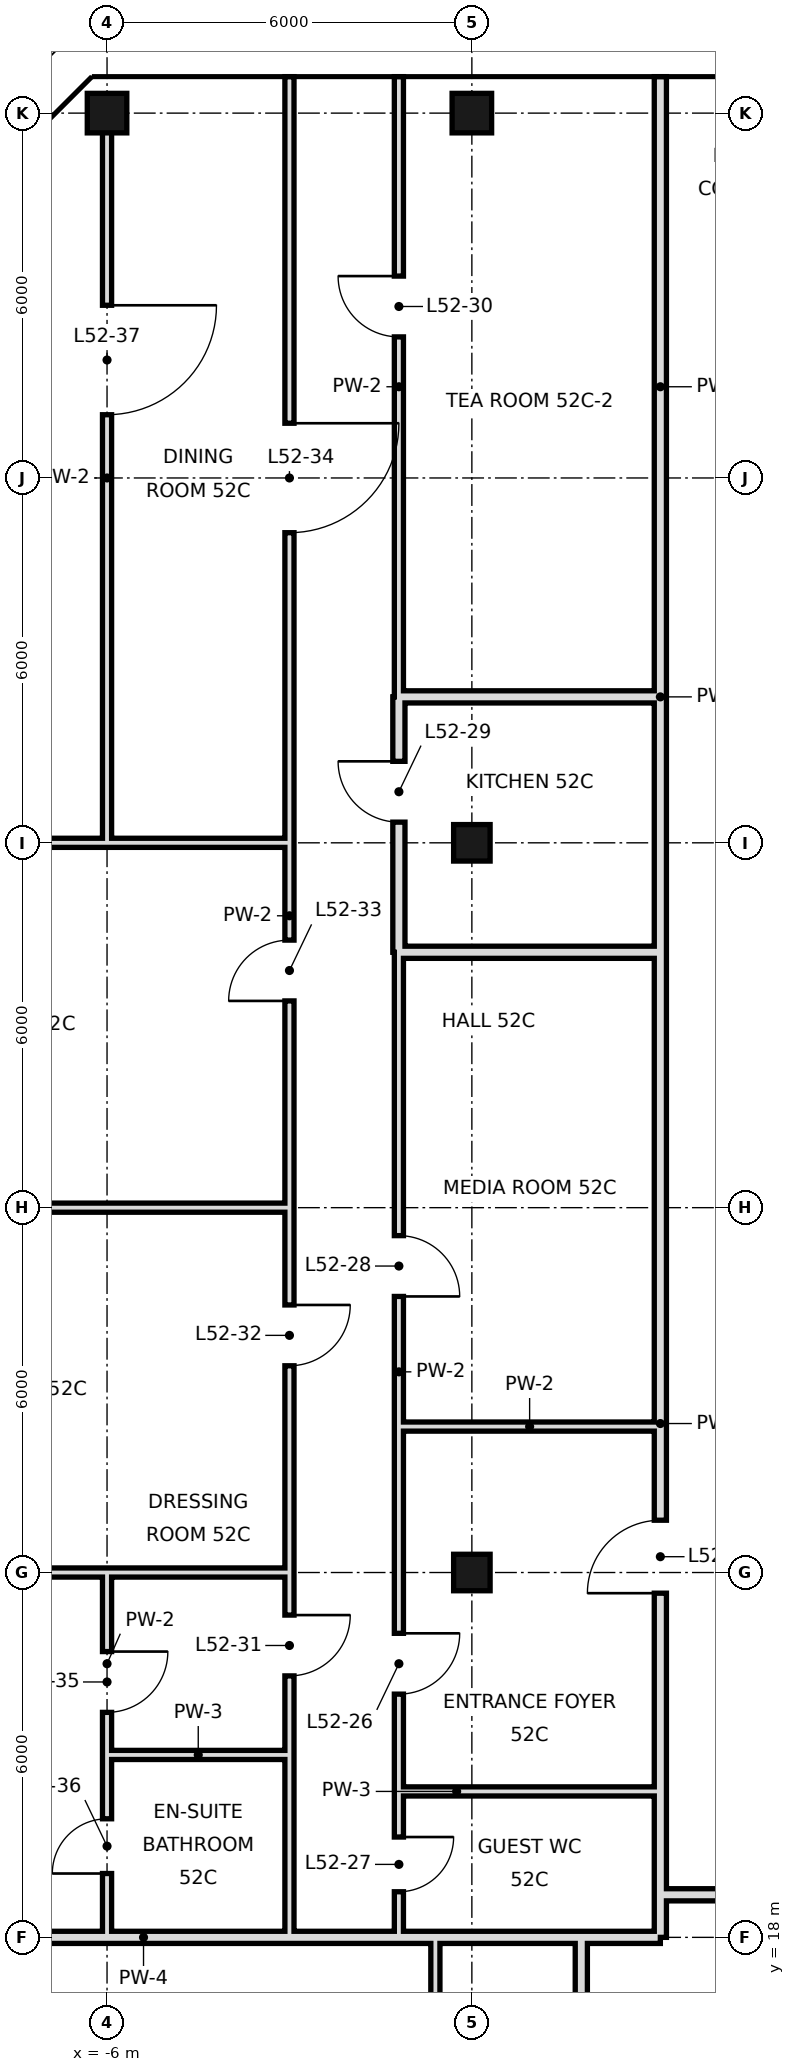
"""IFC4 building model, lengths in metres.
Left out: names, types, materials, properties, quantities, classifications, styles, units other than length and angle.
Written with IfcOpenShell. Run it as: python <this file> out.ifc"""

import sys

from ifc_helpers import new_model, si_unit, direction, frame, frame_2d, origin, origin_2d, place, context, subcontext, project, spatial, rectangle, hollow_rectangle, extrude, element, fill, save


model = new_model("IFC4")
c1 = context("Model", 3, precision=1e-05, world=origin(), true_north=direction((0.0, 1.0)))
c2 = subcontext(c1, "Body", "Model", "MODEL_VIEW")
j1 = project(units=[si_unit("LENGTHUNIT", "METRE"), si_unit("PLANEANGLEUNIT", "RADIAN")], contexts=[c1])
p1 = place(None, origin())
s1 = spatial("IfcSite", under=j1, at=p1, CompositionType="ELEMENT")
p2 = place(p1, origin())
s2 = spatial("IfcBuilding", under=s1, at=p2, CompositionType="ELEMENT")
p3 = place(p2, frame((0.0, 0.0, 222.6)))
s3 = spatial("IfcBuildingStorey", under=s2, at=p3, CompositionType="ELEMENT", Elevation=222.6)
p4 = place(p3, frame((-6.0, 48.0, 0.0), z_axis=(0.0, 0.0, 1.0), x_axis=(1.0, 0.0, 0.0)))
e1 = element("IfcColumn", 1, at=p4, inside=s3, PredefinedType="COLUMN", context=c2, shape_type="SweptSolid", body=[
    extrude(hollow_rectangle(XDim=0.65, YDim=0.65, WallThickness=0.032, at=origin_2d()), origin(), (0.0, 0.0, 1.0), 3.6),
])
for number, where, z_axis, x_axis in (
    (2, (0.0, 24.0, 0.0), (0.0, 0.0, 1.0), (1.0, 0.0, 0.0)),
    (3, (0.0, 36.0, 0.0), (0.0, 0.0, 1.0), (1.0, 0.0, 0.0)),
):
    element("IfcColumn", number, at=place(p3, frame(where, z_axis=z_axis, x_axis=x_axis)), inside=s3, PredefinedType="COLUMN", context=c2, shape_type="SweptSolid", body=[
        extrude(hollow_rectangle(XDim=0.6, YDim=0.6, WallThickness=0.028, at=origin_2d()), origin(), (0.0, 0.0, 1.0), 3.6),
    ])
p5 = place(p3, frame((0.0, 48.0, 0.0), z_axis=(0.0, 0.0, 1.0), x_axis=(1.0, 0.0, 0.0)))
e4 = element("IfcColumn", 4, at=p5, inside=s3, PredefinedType="COLUMN", context=c2, shape_type="SweptSolid", body=[
    extrude(hollow_rectangle(XDim=0.65, YDim=0.65, WallThickness=0.032, at=origin_2d()), origin(), (0.0, 0.0, 1.0), 3.6),
])
p6 = place(p3, frame((-0.6, 10.8, 0.0), z_axis=(0.0, 0.0, 1.0), x_axis=(0.0, 1.0, 0.0)))
e5 = element("IfcWall", 5, at=p6, inside=s3, PredefinedType="PARTITIONING", context=c2, shape_type="SweptSolid", body=[
    extrude(rectangle(XDim=7.2, YDim=0.15, at=frame_2d((3.6, 0.0))), origin(), (0.0, 0.0, 1.0), 3.42),
])
p7 = place(p3, frame((-1.2, 34.2, 0.0), z_axis=(0.0, 0.0, 1.0), x_axis=(0.0, 1.0, 0.0)))
e6 = element("IfcWall", 6, at=p7, inside=s3, PredefinedType="SOLIDWALL", context=c2, shape_type="SweptSolid", body=[
    extrude(rectangle(XDim=4.2, YDim=0.2, at=frame_2d((2.1, 0.0))), origin(), (0.0, 0.0, 1.0), 2.72),
])
p8 = place(p7, frame((2.14, 0.0, 0.0)))
e7 = element("IfcOpeningElement", 7, at=p8, cuts=e6, PredefinedType="OPENING", context=c2, shape_type="SweptSolid", body=[
    extrude(rectangle(XDim=1.0, YDim=2.4, at=frame_2d((0.5, 1.2))), frame((0.0, 0.11, 0.0), z_axis=(0.0, -1.0, 0.0), x_axis=(1.0, 0.0, 0.0)), (0.0, 0.0, 1.0), 0.22),
])
p9 = place(p3, frame((-1.2, 20.4, 0.0), z_axis=(0.0, 0.0, 1.0), x_axis=(0.0, 1.0, 0.0)))
e8 = element("IfcWall", 8, at=p9, inside=s3, PredefinedType="PARTITIONING", context=c2, shape_type="SweptSolid", body=[
    extrude(rectangle(XDim=13.8, YDim=0.15, at=frame_2d((6.9, 0.0))), origin(), (0.0, 0.0, 1.0), 3.42),
])
p10 = place(p9, frame((1.6, 0.0, 0.0)))
e9 = element("IfcOpeningElement", 9, at=p10, cuts=e8, PredefinedType="OPENING", context=c2, shape_type="SweptSolid", body=[
    extrude(rectangle(XDim=1.0, YDim=2.4, at=frame_2d((0.5, 1.2))), frame((0.0, 0.085, 0.0), z_axis=(0.0, -1.0, 0.0), x_axis=(1.0, 0.0, 0.0)), (0.0, 0.0, 1.0), 0.17),
])
p11 = place(p9, frame((8.14, 0.0, 0.0)))
e10 = element("IfcOpeningElement", 10, at=p11, cuts=e8, PredefinedType="OPENING", context=c2, shape_type="SweptSolid", body=[
    extrude(rectangle(XDim=1.0, YDim=2.4, at=frame_2d((0.5, 1.2))), frame((0.0, 0.085, 0.0), z_axis=(0.0, -1.0, 0.0), x_axis=(1.0, 0.0, 0.0)), (0.0, 0.0, 1.0), 0.17),
])
p12 = place(p3, frame((-1.2, 38.4, 0.0), z_axis=(0.0, 0.0, 1.0), x_axis=(0.0, 1.0, 0.0)))
e11 = element("IfcWall", 11, at=p12, inside=s3, PredefinedType="PARTITIONING", context=c2, shape_type="SweptSolid", body=[
    extrude(rectangle(XDim=10.2, YDim=0.15, at=frame_2d((5.1, 0.0))), origin(), (0.0, 0.0, 1.0), 3.42),
])
p13 = place(p12, frame((5.92, 0.0, 0.0)))
e12 = element("IfcOpeningElement", 12, at=p13, cuts=e11, PredefinedType="OPENING", context=c2, shape_type="SweptSolid", body=[
    extrude(rectangle(XDim=1.0, YDim=2.4, at=frame_2d((0.5, 1.2))), frame((0.0, 0.085, 0.0), z_axis=(0.0, -1.0, 0.0), x_axis=(1.0, 0.0, 0.0)), (0.0, 0.0, 1.0), 0.17),
])
p14 = place(p3, frame((-1.2, 18.0, 0.0), z_axis=(0.0, 0.0, 1.0), x_axis=(0.0, 1.0, 0.0)))
e13 = element("IfcWall", 13, at=p14, inside=s3, PredefinedType="PARTITIONING", context=c2, shape_type="SweptSolid", body=[
    extrude(rectangle(XDim=2.4, YDim=0.15, at=frame_2d((1.2, 0.0))), origin(), (0.0, 0.0, 1.0), 3.42),
])
p15 = place(p14, frame((0.75, 0.0, 0.0)))
e14 = element("IfcOpeningElement", 14, at=p15, cuts=e13, PredefinedType="OPENING", context=c2, shape_type="SweptSolid", body=[
    extrude(rectangle(XDim=0.9, YDim=2.4, at=frame_2d((0.45, 1.2))), frame((0.0, 0.085, 0.0), z_axis=(0.0, -1.0, 0.0), x_axis=(1.0, 0.0, 0.0)), (0.0, 0.0, 1.0), 0.17),
])
p16 = place(p3, frame((-3.0, 21.0, 0.0), z_axis=(0.0, 0.0, 1.0), x_axis=(0.0, 1.0, 0.0)))
e15 = element("IfcWall", 15, at=p16, inside=s3, PredefinedType="PARTITIONING", context=c2, shape_type="SweptSolid", body=[
    extrude(rectangle(XDim=27.6, YDim=0.15, at=frame_2d((13.8, 0.0))), origin(), (0.0, 0.0, 1.0), 3.42),
])
p17 = place(p16, frame((1.3, 0.0, 0.0)))
e16 = element("IfcOpeningElement", 16, at=p17, cuts=e15, PredefinedType="OPENING", context=c2, shape_type="SweptSolid", body=[
    extrude(rectangle(XDim=1.0, YDim=2.4, at=frame_2d((0.5, 1.2))), frame((0.0, 0.085, 0.0), z_axis=(0.0, -1.0, 0.0), x_axis=(1.0, 0.0, 0.0)), (0.0, 0.0, 1.0), 0.17),
])
p18 = place(p16, frame((6.4, 0.0, 0.0)))
e17 = element("IfcOpeningElement", 17, at=p18, cuts=e15, PredefinedType="OPENING", context=c2, shape_type="SweptSolid", body=[
    extrude(rectangle(XDim=1.0, YDim=2.4, at=frame_2d((0.5, 1.2))), frame((0.0, 0.085, 0.0), z_axis=(0.0, -1.0, 0.0), x_axis=(1.0, 0.0, 0.0)), (0.0, 0.0, 1.0), 0.17),
])
p19 = place(p16, frame((12.4, 0.0, 0.0)))
e18 = element("IfcOpeningElement", 18, at=p19, cuts=e15, PredefinedType="OPENING", context=c2, shape_type="SweptSolid", body=[
    extrude(rectangle(XDim=1.0, YDim=2.4, at=frame_2d((0.5, 1.2))), frame((0.0, 0.085, 0.0), z_axis=(0.0, -1.0, 0.0), x_axis=(1.0, 0.0, 0.0)), (0.0, 0.0, 1.0), 0.17),
])
p20 = place(p16, frame((20.1, 0.0, 0.0)))
e19 = element("IfcOpeningElement", 19, at=p20, cuts=e15, PredefinedType="OPENING", context=c2, shape_type="SweptSolid", body=[
    extrude(rectangle(XDim=1.8, YDim=2.4, at=frame_2d((0.9, 1.2))), frame((0.0, 0.085, 0.0), z_axis=(0.0, -1.0, 0.0), x_axis=(1.0, 0.0, 0.0)), (0.0, 0.0, 1.0), 0.17),
])
p21 = place(p3, frame((-3.0, 18.0, 0.0), z_axis=(0.0, 0.0, 1.0), x_axis=(0.0, 1.0, 0.0)))
e20 = element("IfcWall", 20, at=p21, inside=s3, PredefinedType="PARTITIONING", context=c2, shape_type="SweptSolid", body=[
    extrude(rectangle(XDim=3.0, YDim=0.15, at=frame_2d((1.5, 0.0))), origin(), (0.0, 0.0, 1.0), 3.42),
])
p22 = place(p3, frame((-6.0, 21.0, 0.0), z_axis=(0.0, 0.0, 1.0), x_axis=(0.0, 1.0, 0.0)))
e21 = element("IfcWall", 21, at=p22, inside=s3, PredefinedType="PARTITIONING", context=c2, shape_type="SweptSolid", body=[
    extrude(rectangle(XDim=3.0, YDim=0.15, at=frame_2d((1.5, 0.0))), origin(), (0.0, 0.0, 1.0), 3.42),
])
p23 = place(p22, frame((0.7, 0.0, 0.0)))
e22 = element("IfcOpeningElement", 22, at=p23, cuts=e21, PredefinedType="OPENING", context=c2, shape_type="SweptSolid", body=[
    extrude(rectangle(XDim=1.0, YDim=2.4, at=frame_2d((0.5, 1.2))), frame((0.0, 0.085, 0.0), z_axis=(0.0, -1.0, 0.0), x_axis=(1.0, 0.0, 0.0)), (0.0, 0.0, 1.0), 0.17),
])
p24 = place(p3, frame((-6.0, 36.0, 0.0), z_axis=(0.0, 0.0, 1.0), x_axis=(0.0, 1.0, 0.0)))
e23 = element("IfcWall", 23, at=p24, inside=s3, PredefinedType="PARTITIONING", context=c2, shape_type="SweptSolid", body=[
    extrude(rectangle(XDim=12.0, YDim=0.15, at=frame_2d((6.0, 0.0))), origin(), (0.0, 0.0, 1.0), 3.42),
])
p25 = place(p24, frame((7.04, 0.0, 0.0)))
e24 = element("IfcOpeningElement", 24, at=p25, cuts=e23, PredefinedType="OPENING", context=c2, shape_type="SweptSolid", body=[
    extrude(rectangle(XDim=1.8, YDim=2.4, at=frame_2d((0.9, 1.2))), frame((0.0, 0.085, 0.0), z_axis=(0.0, -1.0, 0.0), x_axis=(1.0, 0.0, 0.0)), (0.0, 0.0, 1.0), 0.17),
])
p26 = place(p3, frame((-6.0, 18.0, 0.0), z_axis=(0.0, 0.0, 1.0), x_axis=(0.0, 1.0, 0.0)))
e25 = element("IfcWall", 25, at=p26, inside=s3, PredefinedType="PARTITIONING", context=c2, shape_type="SweptSolid", body=[
    extrude(rectangle(XDim=3.0, YDim=0.15, at=frame_2d((1.5, 0.0))), origin(), (0.0, 0.0, 1.0), 3.42),
])
p27 = place(p26, frame((1.05, 0.0, 0.0)))
e26 = element("IfcOpeningElement", 26, at=p27, cuts=e25, PredefinedType="OPENING", context=c2, shape_type="SweptSolid", body=[
    extrude(rectangle(XDim=0.9, YDim=2.4, at=frame_2d((0.45, 1.2))), frame((0.0, 0.085, 0.0), z_axis=(0.0, -1.0, 0.0), x_axis=(1.0, 0.0, 0.0)), (0.0, 0.0, 1.0), 0.17),
])
p28 = place(p3, frame((1.8, 10.8, 0.0), z_axis=(0.0, 0.0, 1.0), x_axis=(0.0, 1.0, 0.0)))
e27 = element("IfcWall", 27, at=p28, inside=s3, PredefinedType="SOLIDWALL", context=c2, shape_type="SweptSolid", body=[
    extrude(rectangle(XDim=7.2, YDim=0.2, at=frame_2d((3.6, 0.0))), origin(), (0.0, 0.0, 1.0), 3.42),
])
p29 = place(p3, frame((3.1, 18.7, 0.0), z_axis=(0.0, 0.0, 1.0), x_axis=(0.0, 1.0, 0.0)))
e28 = element("IfcWall", 28, at=p29, inside=s3, PredefinedType="SOLIDWALL", context=c2, shape_type="SweptSolid", body=[
    extrude(rectangle(XDim=15.5, YDim=0.2, at=frame_2d((7.75, 0.0))), origin(), (0.0, 0.0, 1.0), 2.97),
])
p30 = place(p29, frame((4.96, 0.0, 0.0)))
e29 = element("IfcOpeningElement", 29, at=p30, cuts=e28, PredefinedType="OPENING", context=c2, shape_type="SweptSolid", body=[
    extrude(rectangle(XDim=1.2, YDim=2.4, at=frame_2d((0.6, 1.2))), frame((0.0, 0.11, 0.0), z_axis=(0.0, -1.0, 0.0), x_axis=(1.0, 0.0, 0.0)), (0.0, 0.0, 1.0), 0.22),
])
p31 = place(p3, frame((3.1, 38.4, 0.0), z_axis=(0.0, 0.0, 1.0), x_axis=(0.0, 1.0, 0.0)))
e30 = element("IfcWall", 30, at=p31, inside=s3, PredefinedType="SOLIDWALL", context=c2, shape_type="SweptSolid", body=[
    extrude(rectangle(XDim=10.2, YDim=0.2, at=frame_2d((5.1, 0.0))), origin(), (0.0, 0.0, 1.0), 2.72),
])
p32 = place(p3, frame((3.1, 18.0, 0.0), z_axis=(0.0, 0.0, 1.0), x_axis=(0.0, 1.0, 0.0)))
e31 = element("IfcWall", 31, at=p32, inside=s3, PredefinedType="SOLIDWALL", context=c2, shape_type="SweptSolid", body=[
    extrude(rectangle(XDim=0.7, YDim=0.2, at=frame_2d((0.35, 0.0))), origin(), (0.0, 0.0, 1.0), 2.97),
])
p33 = place(p3, frame((3.1, 34.2, 0.0), z_axis=(0.0, 0.0, 1.0), x_axis=(0.0, 1.0, 0.0)))
e32 = element("IfcWall", 32, at=p33, inside=s3, PredefinedType="SOLIDWALL", context=c2, shape_type="SweptSolid", body=[
    extrude(rectangle(XDim=4.2, YDim=0.2, at=frame_2d((2.1, 0.0))), origin(), (0.0, 0.0, 1.0), 3.42),
])
p34 = place(p3, frame((1.8, 18.0, 0.0), z_axis=(0.0, 0.0, 1.0), x_axis=(1.0, 0.0, 0.0)))
e33 = element("IfcWall", 33, at=p34, inside=s3, PredefinedType="SOLIDWALL", context=c2, shape_type="SweptSolid", body=[
    extrude(rectangle(XDim=1.3, YDim=0.2, at=frame_2d((0.65, 0.0))), origin(), (0.0, 0.0, 1.0), 2.97),
])
p35 = place(p3, frame((-12.6, 18.0, 0.0), z_axis=(0.0, 0.0, 1.0), x_axis=(1.0, 0.0, 0.0)))
e34 = element("IfcWall", 34, at=p35, inside=s3, PredefinedType="SOLIDWALL", context=c2, shape_type="SweptSolid", body=[
    extrude(rectangle(XDim=14.4, YDim=0.2, at=frame_2d((7.2, 0.0))), origin(), (0.0, 0.0, 1.0), 2.72),
])
p36 = place(p3, frame((3.1, 18.7, 0.0), z_axis=(0.0, 0.0, 1.0), x_axis=(1.0, 0.0, 0.0)))
e35 = element("IfcWall", 35, at=p36, inside=s3, PredefinedType="SOLIDWALL", context=c2, shape_type="SweptSolid", body=[
    extrude(rectangle(XDim=4.1, YDim=0.2, at=frame_2d((2.05, 0.0))), origin(), (0.0, 0.0, 1.0), 2.72),
])
p37 = place(p3, frame((-1.2, 20.4, 0.0), z_axis=(0.0, 0.0, 1.0), x_axis=(1.0, 0.0, 0.0)))
e36 = element("IfcWall", 36, at=p37, inside=s3, PredefinedType="PARTITIONING", context=c2, shape_type="SweptSolid", body=[
    extrude(rectangle(XDim=4.3, YDim=0.15, at=frame_2d((2.15, 0.0))), origin(), (0.0, 0.0, 1.0), 3.42),
])
p38 = place(p3, frame((-6.0, 21.0, 0.0), z_axis=(0.0, 0.0, 1.0), x_axis=(1.0, 0.0, 0.0)))
e37 = element("IfcWall", 37, at=p38, inside=s3, PredefinedType="PARTITIONING", context=c2, shape_type="SweptSolid", body=[
    extrude(rectangle(XDim=3.0, YDim=0.15, at=frame_2d((1.5, 0.0))), origin(), (0.0, 0.0, 1.0), 3.42),
])
p39 = place(p3, frame((-12.0, 24.0, 0.0), z_axis=(0.0, 0.0, 1.0), x_axis=(1.0, 0.0, 0.0)))
e38 = element("IfcWall", 38, at=p39, inside=s3, PredefinedType="PARTITIONING", context=c2, shape_type="SweptSolid", body=[
    extrude(rectangle(XDim=9.0, YDim=0.15, at=frame_2d((4.5, 0.0))), origin(), (0.0, 0.0, 1.0), 2.72),
])
p40 = place(p3, frame((-1.2, 26.4, 0.0), z_axis=(0.0, 0.0, 1.0), x_axis=(1.0, 0.0, 0.0)))
e39 = element("IfcWall", 39, at=p40, inside=s3, PredefinedType="PARTITIONING", context=c2, shape_type="SweptSolid", body=[
    extrude(rectangle(XDim=4.3, YDim=0.15, at=frame_2d((2.15, 0.0))), origin(), (0.0, 0.0, 1.0), 3.42),
])
p41 = place(p3, frame((-12.6, 30.0, 0.0), z_axis=(0.0, 0.0, 1.0), x_axis=(1.0, 0.0, 0.0)))
e40 = element("IfcWall", 40, at=p41, inside=s3, PredefinedType="PARTITIONING", context=c2, shape_type="SweptSolid", body=[
    extrude(rectangle(XDim=9.6, YDim=0.15, at=frame_2d((4.8, 0.0))), origin(), (0.0, 0.0, 1.0), 2.72),
])
p42 = place(p3, frame((-1.2, 34.2, 0.0), z_axis=(0.0, 0.0, 1.0), x_axis=(1.0, 0.0, 0.0)))
e41 = element("IfcWall", 41, at=p42, inside=s3, PredefinedType="SOLIDWALL", context=c2, shape_type="SweptSolid", body=[
    extrude(rectangle(XDim=4.3, YDim=0.2, at=frame_2d((2.15, 0.0))), origin(), (0.0, 0.0, 1.0), 2.72),
])
p43 = place(p3, frame((-12.0, 36.0, 0.0), z_axis=(0.0, 0.0, 1.0), x_axis=(1.0, 0.0, 0.0)))
e42 = element("IfcWall", 42, at=p43, inside=s3, PredefinedType="PARTITIONING", context=c2, shape_type="SweptSolid", body=[
    extrude(rectangle(XDim=9.0, YDim=0.15, at=frame_2d((4.5, 0.0))), origin(), (0.0, 0.0, 1.0), 2.72),
])
p44 = place(p3, frame((-1.2, 38.4, 0.0), z_axis=(0.0, 0.0, 1.0), x_axis=(1.0, 0.0, 0.0)))
e43 = element("IfcWall", 43, at=p44, inside=s3, PredefinedType="SOLIDWALL", context=c2, shape_type="SweptSolid", body=[
    extrude(rectangle(XDim=4.3, YDim=0.2, at=frame_2d((2.15, 0.0))), origin(), (0.0, 0.0, 1.0), 2.72),
])
p45 = place(p10, origin())
e44 = element("IfcDoor", 44, at=p45, inside=s3, OperationType="SINGLE_SWING_RIGHT", PredefinedType="DOOR", context=c2, shape_type="SweptSolid", body=[
    extrude(rectangle(XDim=1.0, YDim=2.4, at=frame_2d((0.5, 1.2))), frame((0.0, 0.025, 0.0), z_axis=(0.0, -1.0, 0.0), x_axis=(1.0, 0.0, 0.0)), (0.0, 0.0, 1.0), 0.05),
])
fill(e9, e44)
p46 = place(p15, origin())
e45 = element("IfcDoor", 45, at=p46, inside=s3, OperationType="SINGLE_SWING_RIGHT", PredefinedType="DOOR", context=c2, shape_type="SweptSolid", body=[
    extrude(rectangle(XDim=0.9, YDim=2.4, at=frame_2d((0.45, 1.2))), frame((0.0, 0.025, 0.0), z_axis=(0.0, -1.0, 0.0), x_axis=(1.0, 0.0, 0.0)), (0.0, 0.0, 1.0), 0.05),
])
fill(e14, e45)
p47 = place(p11, frame((1.0, 0.0, 0.0), z_axis=(0.0, 0.0, 1.0), x_axis=(-1.0, 0.0, 0.0)))
e46 = element("IfcDoor", 46, at=p47, inside=s3, OperationType="SINGLE_SWING_RIGHT", PredefinedType="DOOR", context=c2, shape_type="SweptSolid", body=[
    extrude(rectangle(XDim=1.0, YDim=2.4, at=frame_2d((0.5, 1.2))), frame((0.0, 0.025, 0.0), z_axis=(0.0, -1.0, 0.0), x_axis=(1.0, 0.0, 0.0)), (0.0, 0.0, 1.0), 0.05),
])
fill(e10, e46)
p48 = place(p8, frame((1.0, 0.0, 0.0), z_axis=(0.0, 0.0, 1.0), x_axis=(-1.0, 0.0, 0.0)))
e47 = element("IfcDoor", 47, at=p48, inside=s3, OperationType="SINGLE_SWING_LEFT", PredefinedType="DOOR", context=c2, shape_type="SweptSolid", body=[
    extrude(rectangle(XDim=1.0, YDim=2.4, at=frame_2d((0.5, 1.2))), frame((0.0, 0.025, 0.0), z_axis=(0.0, -1.0, 0.0), x_axis=(1.0, 0.0, 0.0)), (0.0, 0.0, 1.0), 0.05),
])
fill(e7, e47)
p49 = place(p13, frame((1.0, 0.0, 0.0), z_axis=(0.0, 0.0, 1.0), x_axis=(-1.0, 0.0, 0.0)))
e48 = element("IfcDoor", 48, at=p49, inside=s3, OperationType="SINGLE_SWING_LEFT", PredefinedType="DOOR", context=c2, shape_type="SweptSolid", body=[
    extrude(rectangle(XDim=1.0, YDim=2.4, at=frame_2d((0.5, 1.2))), frame((0.0, 0.025, 0.0), z_axis=(0.0, -1.0, 0.0), x_axis=(1.0, 0.0, 0.0)), (0.0, 0.0, 1.0), 0.05),
])
fill(e12, e48)
p50 = place(p17, origin())
e49 = element("IfcDoor", 49, at=p50, inside=s3, OperationType="SINGLE_SWING_RIGHT", PredefinedType="DOOR", context=c2, shape_type="SweptSolid", body=[
    extrude(rectangle(XDim=1.0, YDim=2.4, at=frame_2d((0.5, 1.2))), frame((0.0, 0.025, 0.0), z_axis=(0.0, -1.0, 0.0), x_axis=(1.0, 0.0, 0.0)), (0.0, 0.0, 1.0), 0.05),
])
fill(e16, e49)
p51 = place(p18, origin())
e50 = element("IfcDoor", 50, at=p51, inside=s3, OperationType="SINGLE_SWING_RIGHT", PredefinedType="DOOR", context=c2, shape_type="SweptSolid", body=[
    extrude(rectangle(XDim=1.0, YDim=2.4, at=frame_2d((0.5, 1.2))), frame((0.0, 0.025, 0.0), z_axis=(0.0, -1.0, 0.0), x_axis=(1.0, 0.0, 0.0)), (0.0, 0.0, 1.0), 0.05),
])
fill(e17, e50)
p52 = place(p19, origin())
e51 = element("IfcDoor", 51, at=p52, inside=s3, OperationType="SINGLE_SWING_LEFT", PredefinedType="DOOR", context=c2, shape_type="SweptSolid", body=[
    extrude(rectangle(XDim=1.0, YDim=2.4, at=frame_2d((0.5, 1.2))), frame((0.0, 0.025, 0.0), z_axis=(0.0, -1.0, 0.0), x_axis=(1.0, 0.0, 0.0)), (0.0, 0.0, 1.0), 0.05),
])
fill(e18, e51)
p53 = place(p20, origin())
e52 = element("IfcDoor", 52, at=p53, inside=s3, OperationType="SINGLE_SWING_RIGHT", PredefinedType="DOOR", context=c2, shape_type="SweptSolid", body=[
    extrude(rectangle(XDim=1.8, YDim=2.4, at=frame_2d((0.9, 1.2))), frame((0.0, 0.025, 0.0), z_axis=(0.0, -1.0, 0.0), x_axis=(1.0, 0.0, 0.0)), (0.0, 0.0, 1.0), 0.05),
])
fill(e19, e52)
p54 = place(p23, origin())
e53 = element("IfcDoor", 53, at=p54, inside=s3, OperationType="SINGLE_SWING_RIGHT", PredefinedType="DOOR", context=c2, shape_type="SweptSolid", body=[
    extrude(rectangle(XDim=1.0, YDim=2.4, at=frame_2d((0.5, 1.2))), frame((0.0, 0.025, 0.0), z_axis=(0.0, -1.0, 0.0), x_axis=(1.0, 0.0, 0.0)), (0.0, 0.0, 1.0), 0.05),
])
fill(e22, e53)
p55 = place(p27, origin())
e54 = element("IfcDoor", 54, at=p55, inside=s3, OperationType="SINGLE_SWING_LEFT", PredefinedType="DOOR", context=c2, shape_type="SweptSolid", body=[
    extrude(rectangle(XDim=0.9, YDim=2.4, at=frame_2d((0.45, 1.2))), frame((0.0, 0.025, 0.0), z_axis=(0.0, -1.0, 0.0), x_axis=(1.0, 0.0, 0.0)), (0.0, 0.0, 1.0), 0.05),
])
fill(e26, e54)
p56 = place(p25, origin())
e55 = element("IfcDoor", 55, at=p56, inside=s3, OperationType="SINGLE_SWING_RIGHT", PredefinedType="DOOR", context=c2, shape_type="SweptSolid", body=[
    extrude(rectangle(XDim=1.8, YDim=2.4, at=frame_2d((0.9, 1.2))), frame((0.0, 0.025, 0.0), z_axis=(0.0, -1.0, 0.0), x_axis=(1.0, 0.0, 0.0)), (0.0, 0.0, 1.0), 0.05),
])
fill(e24, e55)
p57 = place(p30, origin())
e56 = element("IfcDoor", 56, at=p57, inside=s3, OperationType="SINGLE_SWING_LEFT", PredefinedType="DOOR", context=c2, shape_type="SweptSolid", body=[
    extrude(rectangle(XDim=1.2, YDim=2.4, at=frame_2d((0.6, 1.2))), frame((0.0, 0.025, 0.0), z_axis=(0.0, -1.0, 0.0), x_axis=(1.0, 0.0, 0.0)), (0.0, 0.0, 1.0), 0.05),
])
fill(e29, e56)
save(model, sys.argv[1])
